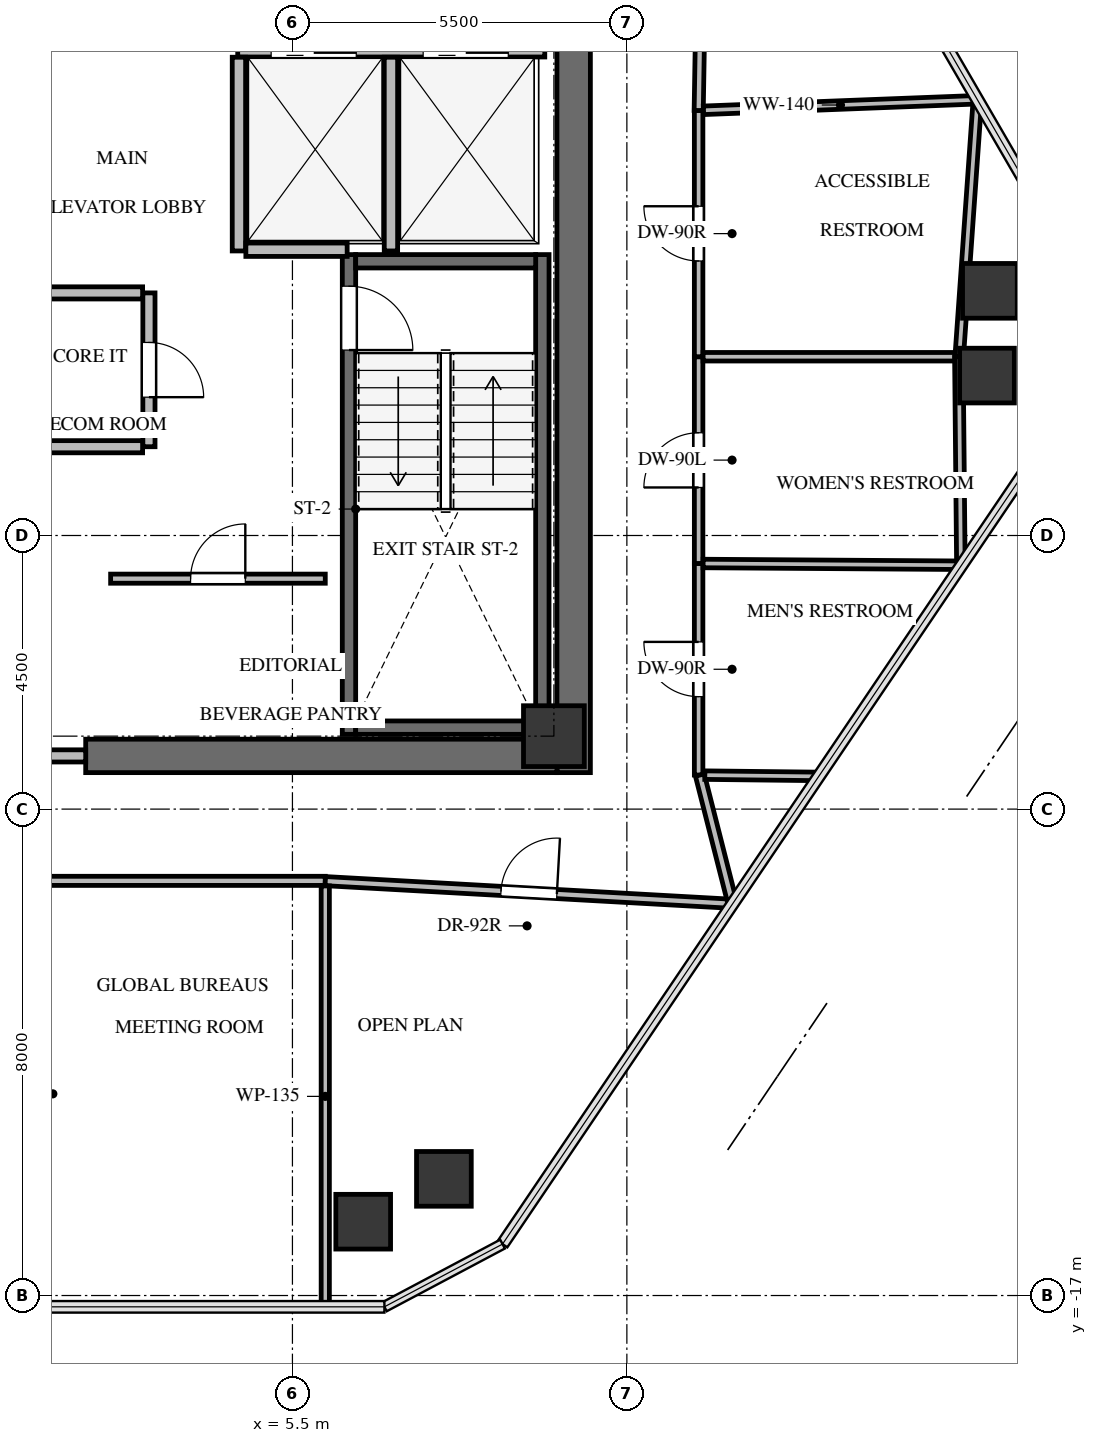
"""IFC4 building model, lengths in metres.
Left out: names, types, materials, properties, quantities, classifications, styles, units other than length and angle.
Written with IfcOpenShell. Run it as: python <this file> out.ifc"""

import sys

from ifc_helpers import new_model, si_unit, direction, frame, frame_2d, origin, origin_2d, place, context, subcontext, project, spatial, rectangle, extrude, source, transform, mapped, element, fill, save


model = new_model("IFC4")
c1 = context("Model", 3, precision=1e-05, world=origin(), true_north=direction((0.0, 1.0)))
c2 = subcontext(c1, "Body", "Model", "MODEL_VIEW")
j1 = project(units=[si_unit("LENGTHUNIT", "METRE"), si_unit("PLANEANGLEUNIT", "RADIAN")], contexts=[c1])
p1 = place(None, origin())
s1 = spatial("IfcSite", under=j1, at=p1, CompositionType="ELEMENT")
p2 = place(p1, origin())
s2 = spatial("IfcBuilding", under=s1, at=p2, CompositionType="ELEMENT")
p3 = place(p2, frame((0.0, 0.0, 238.1)))
s3 = spatial("IfcBuildingStorey", under=s2, at=p3, CompositionType="ELEMENT", Elevation=238.1)
p4 = place(p3, frame((10.125, -8.4, 0.0), z_axis=(0.0, 0.0, 1.0), x_axis=(0.0, 1.0, 0.0)))
e1 = element("IfcWall", 1, at=p4, inside=s3, PredefinedType="SHEAR", context=c2, shape_type="SweptSolid", body=[
    extrude(rectangle(XDim=16.8, YDim=0.55, at=frame_2d((8.4, 0.0))), origin(), (0.0, 0.0, 1.0), 3.3),
])
p5 = place(p3, frame((2.1, -8.125, 0.0), z_axis=(0.0, 0.0, 1.0), x_axis=(1.0, 0.0, 0.0)))
e2 = element("IfcWall", 2, at=p5, inside=s3, PredefinedType="SHEAR", context=c2, shape_type="SweptSolid", body=[
    extrude(rectangle(XDim=7.75, YDim=0.55, at=frame_2d((3.875, 0.0))), origin(), (0.0, 0.0, 1.0), 3.3),
])
p6 = place(p3, frame((9.61, -7.77, -0.24), z_axis=(0.0, 0.0, 1.0), x_axis=(0.0, 1.0, 0.0)))
e3 = element("IfcWall", 3, at=p6, inside=s3, PredefinedType="SHEAR", context=c2, shape_type="SweptSolid", body=[
    extrude(rectangle(XDim=7.89, YDim=0.22, at=frame_2d((3.945, 0.0))), origin(), (0.0, 0.0, 1.0), 3.3),
])
p7 = place(p3, frame((6.43, 0.12, -0.24), z_axis=(0.0, 0.0, 1.0), x_axis=(0.0, -1.0, 0.0)))
e4 = element("IfcWall", 4, at=p7, inside=s3, PredefinedType="SHEAR", context=c2, shape_type="SweptSolid", body=[
    extrude(rectangle(XDim=7.89, YDim=0.22, at=frame_2d((3.945, 0.0))), origin(), (0.0, 0.0, 1.0), 3.3),
])
p8 = place(p7, frame((0.52, 0.0, 0.0)))
e5 = element("IfcOpeningElement", 5, at=p8, cuts=e4, PredefinedType="OPENING", context=c2, shape_type="SweptSolid", body=[
    extrude(rectangle(XDim=1.05, YDim=2.15, at=frame_2d((0.525, 1.075))), frame((0.0, 0.12, 0.0), z_axis=(0.0, -1.0, 0.0), x_axis=(1.0, 0.0, 0.0)), (0.0, 0.0, 1.0), 0.24),
])
for number, where, z_axis, x_axis in (
    (6, (6.54, -7.66, -0.24), (0.0, 0.0, 1.0), (1.0, 0.0, 0.0)),
    (7, (9.5, 0.01, -0.24), (0.0, 0.0, 1.0), (-1.0, 0.0, 0.0)),
):
    element("IfcWall", number, at=place(p3, frame(where, z_axis=z_axis, x_axis=x_axis)), inside=s3, PredefinedType="SHEAR", context=c2, shape_type="SweptSolid", body=[
        extrude(rectangle(XDim=2.96, YDim=0.22, at=frame_2d((1.48, 0.0))), origin(), (0.0, 0.0, 1.0), 3.3),
    ])
m1 = source(origin(), c2, "Body", "SweptSolid", [
    extrude(rectangle(XDim=1.0, YDim=1.0, at=origin_2d()), origin(), (0.0, 0.0, 1.0), 3.3),
])
p9 = place(p3, frame((9.8, -7.8, -0.24), z_axis=(0.0, 0.0, 1.0), x_axis=(1.0, 0.0, 0.0)))
e8 = element("IfcColumn", 8, at=p9, inside=s3, PredefinedType="COLUMN", context=c2, shape_type="MappedRepresentation", body=[
    mapped(m1, transform((0.0, 0.0, 0.0), x_axis=(1.0, 0.0, 0.0), y_axis=(0.0, 1.0, 0.0), z_axis=(0.0, 0.0, 1.0), scale=1.0)),
])
m2 = source(origin(), c2, "Body", "SweptSolid", [
    extrude(rectangle(XDim=0.9, YDim=0.9, at=origin_2d()), origin(), (0.0, 0.0, 1.0), 3.3),
])
for number, where, z_axis, x_axis in (
    (9, (16.97, -0.476, -0.24), (0.0, 0.0, 1.0), (1.0, 0.0, 0.0)),
    (10, (16.922, -1.87, -0.24), (0.0, 0.0, 1.0), (1.0, 0.0, 0.0)),
    (11, (7.991, -15.081, -0.24), (0.0, 0.0, 1.0), (1.0, 0.0, 0.0)),
    (12, (6.664, -15.786, -0.24), (0.0, 0.0, 1.0), (1.0, 0.0, 0.0)),
):
    element("IfcColumn", number, at=place(p3, frame(where, z_axis=z_axis, x_axis=x_axis)), inside=s3, PredefinedType="COLUMN", context=c2, shape_type="MappedRepresentation", body=[
        mapped(m2, transform((0.0, 0.0, 0.0), x_axis=(1.0, 0.0, 0.0), y_axis=(0.0, 1.0, 0.0), z_axis=(0.0, 0.0, 1.0), scale=1.0)),
    ])
p10 = place(p3, frame((-2.1, -8.125, 0.0), z_axis=(0.0, 0.0, 1.0), x_axis=(1.0, 0.0, 0.0)))
e13 = element("IfcWall", 13, at=p10, inside=s3, PredefinedType="SOLIDWALL", context=c2, shape_type="SweptSolid", body=[
    extrude(rectangle(XDim=4.2, YDim=0.2, at=frame_2d((2.1, 0.0))), origin(), (0.0, 0.0, 1.0), 3.045),
])
p11 = place(p10, frame((1.2, 0.0, 0.0)))
e14 = element("IfcOpeningElement", 14, at=p11, cuts=e13, PredefinedType="OPENING", context=c2, shape_type="SweptSolid", body=[
    extrude(rectangle(XDim=1.8, YDim=2.15, at=frame_2d((0.9, 1.075))), frame((0.0, 0.11, 0.0), z_axis=(0.0, -1.0, 0.0), x_axis=(1.0, 0.0, 0.0)), (0.0, 0.0, 1.0), 0.22),
])
p12 = place(p3, frame((4.6, 3.48, 0.0), z_axis=(0.0, 0.0, 1.0), x_axis=(1.0, 0.0, 0.0)))
e15 = element("IfcWall", 15, at=p12, inside=s3, PredefinedType="SOLIDWALL", context=c2, shape_type="SweptSolid", body=[
    extrude(rectangle(XDim=5.05, YDim=0.22, at=frame_2d((2.525, 0.0))), origin(), (0.0, 0.0, 1.0), 3.045),
])
p13 = place(p12, frame((0.55, 0.0, 0.0)))
e16 = element("IfcOpeningElement", 16, at=p13, cuts=e15, PredefinedType="OPENING", context=c2, shape_type="SweptSolid", body=[
    extrude(rectangle(XDim=1.4, YDim=2.15, at=frame_2d((0.7, 1.075))), frame((0.0, 0.12, 0.0), z_axis=(0.0, -1.0, 0.0), x_axis=(1.0, 0.0, 0.0)), (0.0, 0.0, 1.0), 0.24),
])
p14 = place(p12, frame((3.05, 0.0, 0.0)))
e17 = element("IfcOpeningElement", 17, at=p14, cuts=e15, PredefinedType="OPENING", context=c2, shape_type="SweptSolid", body=[
    extrude(rectangle(XDim=1.4, YDim=2.15, at=frame_2d((0.7, 1.075))), frame((0.0, 0.12, 0.0), z_axis=(0.0, -1.0, 0.0), x_axis=(1.0, 0.0, 0.0)), (0.0, 0.0, 1.0), 0.24),
])
for number, where, z_axis, x_axis in (
    (18, (4.62, 0.18, 0.0), (0.0, 0.0, 1.0), (0.0, 1.0, 0.0)),
    (19, (7.12, 0.18, 0.0), (0.0, 0.0, 1.0), (0.0, 1.0, 0.0)),
):
    element("IfcWall", number, at=place(p3, frame(where, z_axis=z_axis, x_axis=x_axis)), inside=s3, PredefinedType="SOLIDWALL", context=c2, shape_type="SweptSolid", body=[
        extrude(rectangle(XDim=3.186, YDim=0.22, at=frame_2d((1.593, 0.0))), origin(), (0.0, 0.0, 1.0), 3.045),
    ])
p15 = place(p3, frame((4.734, 0.2, 0.0), z_axis=(0.0, 0.0, 1.0), x_axis=(1.0, 0.0, 0.0)))
e20 = element("IfcWall", 20, at=p15, inside=s3, PredefinedType="SOLIDWALL", context=c2, shape_type="SweptSolid", body=[
    extrude(rectangle(XDim=1.666, YDim=0.22, at=frame_2d((0.833, 0.0))), origin(), (0.0, 0.0, 1.0), 3.045),
])
p16 = place(p3, frame((2.51, -5.21, 0.0), z_axis=(0.0, 0.0, 1.0), x_axis=(1.0, 0.0, 0.0)))
e21 = element("IfcWall", 21, at=p16, inside=s3, PredefinedType="PARTITIONING", context=c2, shape_type="SweptSolid", body=[
    extrude(rectangle(XDim=3.53, YDim=0.15, at=frame_2d((1.765, 0.0))), origin(), (0.0, 0.0, 1.0), 3.045),
])
p17 = place(p16, frame((1.315, 0.0, 0.0)))
e22 = element("IfcOpeningElement", 22, at=p17, cuts=e21, PredefinedType="OPENING", context=c2, shape_type="SweptSolid", body=[
    extrude(rectangle(XDim=0.9, YDim=2.05, at=frame_2d((0.45, 1.025))), frame((0.0, 0.085, 0.0), z_axis=(0.0, -1.0, 0.0), x_axis=(1.0, 0.0, 0.0)), (0.0, 0.0, 1.0), 0.17),
])
p18 = place(p3, frame((3.14, -0.51, 0.0), z_axis=(0.0, 0.0, 1.0), x_axis=(0.0, -1.0, 0.0)))
e23 = element("IfcWall", 23, at=p18, inside=s3, PredefinedType="SOLIDWALL", context=c2, shape_type="SweptSolid", body=[
    extrude(rectangle(XDim=2.53, YDim=0.2, at=frame_2d((1.265, 0.0))), origin(), (0.0, 0.0, 1.0), 3.045),
])
p19 = place(p18, frame((0.815, 0.0, 0.0)))
e24 = element("IfcOpeningElement", 24, at=p19, cuts=e23, PredefinedType="OPENING", context=c2, shape_type="SweptSolid", body=[
    extrude(rectangle(XDim=0.9, YDim=2.05, at=frame_2d((0.45, 1.025))), frame((0.0, 0.11, 0.0), z_axis=(0.0, -1.0, 0.0), x_axis=(1.0, 0.0, 0.0)), (0.0, 0.0, 1.0), 0.22),
])
for number, where, z_axis, x_axis in (
    (25, (3.036, -3.04, 0.0), (0.0, 0.0, 1.0), (-1.0, 0.0, 0.0)),
    (26, (1.21, -0.51, 0.0), (0.0, 0.0, 1.0), (1.0, 0.0, 0.0)),
):
    element("IfcWall", number, at=place(p3, frame(where, z_axis=z_axis, x_axis=x_axis)), inside=s3, PredefinedType="SOLIDWALL", context=c2, shape_type="SweptSolid", body=[
        extrude(rectangle(XDim=1.826, YDim=0.2, at=frame_2d((0.913, 0.0))), origin(), (0.0, 0.0, 1.0), 3.045),
    ])
p20 = place(p3, frame((12.18, -8.44, 0.0), z_axis=(0.0, 0.0, 1.0), x_axis=(0.0, 1.0, 0.0)))
e27 = element("IfcWall", 27, at=p20, inside=s3, PredefinedType="PARTITIONING", context=c2, shape_type="SweptSolid", body=[
    extrude(rectangle(XDim=3.48, YDim=0.14, at=frame_2d((1.74, 0.0))), origin(), (0.0, 0.0, 1.0), 2.399),
])
p21 = place(p20, frame((1.29, 0.0, 0.0)))
e28 = element("IfcOpeningElement", 28, at=p21, cuts=e27, PredefinedType="OPENING", context=c2, shape_type="SweptSolid", body=[
    extrude(rectangle(XDim=0.9, YDim=2.05, at=frame_2d((0.45, 1.025))), frame((0.0, 0.08, 0.0), z_axis=(0.0, -1.0, 0.0), x_axis=(1.0, 0.0, 0.0)), (0.0, 0.0, 1.0), 0.16),
])
p22 = place(p3, frame((12.18, -4.96, 0.0), z_axis=(0.0, 0.0, 1.0), x_axis=(0.0, 1.0, 0.0)))
e29 = element("IfcWall", 29, at=p22, inside=s3, PredefinedType="PARTITIONING", context=c2, shape_type="SweptSolid", body=[
    extrude(rectangle(XDim=3.4, YDim=0.14, at=frame_2d((1.7, 0.0))), origin(), (0.0, 0.0, 1.0), 3.045),
])
p23 = place(p22, frame((1.25, 0.0, 0.0)))
e30 = element("IfcOpeningElement", 30, at=p23, cuts=e29, PredefinedType="OPENING", context=c2, shape_type="SweptSolid", body=[
    extrude(rectangle(XDim=0.9, YDim=2.05, at=frame_2d((0.45, 1.025))), frame((0.0, 0.08, 0.0), z_axis=(0.0, -1.0, 0.0), x_axis=(1.0, 0.0, 0.0)), (0.0, 0.0, 1.0), 0.16),
])
p24 = place(p3, frame((12.18, -1.56, 0.0), z_axis=(0.0, 0.0, 1.0), x_axis=(0.0, 1.0, 0.0)))
e31 = element("IfcWall", 31, at=p24, inside=s3, PredefinedType="PARTITIONING", context=c2, shape_type="SweptSolid", body=[
    extrude(rectangle(XDim=4.05, YDim=0.14, at=frame_2d((2.025, 0.0))), origin(), (0.0, 0.0, 1.0), 2.301),
])
p25 = place(p24, frame((1.575, 0.0, 0.0)))
e32 = element("IfcOpeningElement", 32, at=p25, cuts=e31, PredefinedType="OPENING", context=c2, shape_type="SweptSolid", body=[
    extrude(rectangle(XDim=0.9, YDim=2.05, at=frame_2d((0.45, 1.025))), frame((0.0, 0.08, 0.0), z_axis=(0.0, -1.0, 0.0), x_axis=(1.0, 0.0, 0.0)), (0.0, 0.0, 1.0), 0.16),
])
p26 = place(p3, frame((1.089, -10.18, 0.0), z_axis=(0.0, 0.0, 1.0), x_axis=(1.0, 0.0, 0.0)))
e33 = element("IfcWall", 33, at=p26, inside=s3, PredefinedType="PARTITIONING", context=c2, shape_type="SweptSolid", body=[
    extrude(rectangle(XDim=4.951, YDim=0.15, at=frame_2d((2.476, 0.0))), origin(), (0.0, 0.0, 1.0), 2.301),
])
p27 = place(p3, frame((6.04, -10.185, 0.0), z_axis=(0.0, 0.0, 1.0), x_axis=(0.998451046252, -0.055637291801, 0.0)))
e34 = element("IfcWall", 34, at=p27, inside=s3, PredefinedType="PARTITIONING", context=c2, shape_type="SweptSolid", body=[
    extrude(rectangle(XDim=6.709, YDim=0.15, at=frame_2d((3.355, 0.0))), origin(), (0.0, 0.0, 1.0), 2.399),
])
p28 = place(p27, frame((2.895, 0.0, 0.0)))
e35 = element("IfcOpeningElement", 35, at=p28, cuts=e34, PredefinedType="OPENING", context=c2, shape_type="SweptSolid", body=[
    extrude(rectangle(XDim=0.92, YDim=2.1, at=frame_2d((0.46, 1.05))), frame((0.0, 0.085, 0.0), z_axis=(0.0, -1.0, 0.0), x_axis=(1.0, 0.0, 0.0)), (0.0, 0.0, 1.0), 0.17),
])
p29 = place(p3, frame((12.719, -10.478, 0.0), z_axis=(0.0, 0.0, 1.0), x_axis=(-0.246522636262, 0.969137033556, 0.0)))
e36 = element("IfcWall", 36, at=p29, inside=s3, PredefinedType="PARTITIONING", context=c2, shape_type="SweptSolid", body=[
    extrude(rectangle(XDim=2.103, YDim=0.15, at=frame_2d((1.051, 0.0))), origin(), (0.0, 0.0, 1.0), 2.399),
])
p30 = place(p3, frame((12.181, 2.49, 0.0), z_axis=(0.0, 0.0, 1.0), x_axis=(0.016828669653, 0.999858387912, 0.0)))
e37 = element("IfcWall", 37, at=p30, inside=s3, PredefinedType="PARTITIONING", context=c2, shape_type="SweptSolid", body=[
    extrude(rectangle(XDim=7.674, YDim=0.15, at=frame_2d((3.837, 0.0))), origin(), (0.0, 0.0, 1.0), 2.399),
])
p31 = place(p30, frame((3.362, 0.0, 0.0)))
e38 = element("IfcOpeningElement", 38, at=p31, cuts=e37, PredefinedType="OPENING", context=c2, shape_type="SweptSolid", body=[
    extrude(rectangle(XDim=0.95, YDim=2.1, at=frame_2d((0.475, 1.05))), frame((0.0, 0.085, 0.0), z_axis=(0.0, -1.0, 0.0), x_axis=(1.0, 0.0, 0.0)), (0.0, 0.0, 1.0), 0.17),
])
p32 = place(p3, frame((12.254, -4.96, 0.0), z_axis=(0.0, 0.0, 1.0), x_axis=(0.999976630429, -0.006836563198, 0.0)))
e39 = element("IfcWall", 39, at=p32, inside=s3, PredefinedType="PARTITIONING", context=c2, shape_type="SweptSolid", body=[
    extrude(rectangle(XDim=4.25, YDim=0.14, at=frame_2d((2.125, 0.0))), origin(), (0.0, 0.0, 1.0), 2.399),
])
p33 = place(p3, frame((14.156, -8.462, 0.0), z_axis=(0.0, 0.0, 1.0), x_axis=(-0.999935742613, 0.011336253532, 0.0)))
e40 = element("IfcWall", 40, at=p33, inside=s3, PredefinedType="PARTITIONING", context=c2, shape_type="SweptSolid", body=[
    extrude(rectangle(XDim=1.874, YDim=0.14, at=frame_2d((0.937, 0.0))), origin(), (0.0, 0.0, 1.0), 2.399),
])
p34 = place(p3, frame((12.254, -1.56, 0.0), z_axis=(0.0, 0.0, 1.0), x_axis=(1.0, 0.0, 0.0)))
e41 = element("IfcWall", 41, at=p34, inside=s3, PredefinedType="PARTITIONING", context=c2, shape_type="SweptSolid", body=[
    extrude(rectangle(XDim=4.206, YDim=0.14, at=frame_2d((2.103, 0.0))), origin(), (0.0, 0.0, 1.0), 2.301),
])
p35 = place(p3, frame((16.46, -1.56, 0.0), z_axis=(0.0, 0.0, 1.0), x_axis=(0.009604446748, -0.999953876238, 0.0)))
e42 = element("IfcWall", 42, at=p35, inside=s3, PredefinedType="PARTITIONING", context=c2, shape_type="SweptSolid", body=[
    extrude(rectangle(XDim=3.355, YDim=0.14, at=frame_2d((1.678, 0.0))), origin(), (0.0, 0.0, 1.0), 2.301),
])
p36 = place(p3, frame((12.26, 2.493, 0.0), z_axis=(0.0, 0.0, 1.0), x_axis=(0.999256206289, 0.038562082324, 0.0)))
e43 = element("IfcWall", 43, at=p36, inside=s3, PredefinedType="PARTITIONING", context=c2, shape_type="SweptSolid", body=[
    extrude(rectangle(XDim=4.508, YDim=0.14, at=frame_2d((2.254, 0.0))), origin(), (0.0, 0.0, 1.0), 2.399),
])
p37 = place(p3, frame((16.76, 2.593, 0.0), z_axis=(0.0, 0.0, 1.0), x_axis=(-0.07055102187, -0.997508172053, 0.0)))
e44 = element("IfcWall", 44, at=p37, inside=s3, PredefinedType="PARTITIONING", context=c2, shape_type="SweptSolid", body=[
    extrude(rectangle(XDim=4.163, YDim=0.14, at=frame_2d((2.082, 0.0))), origin(), (0.0, 0.0, 1.0), 2.301),
])
p38 = place(p3, frame((6.04, -10.264, 0.0), z_axis=(0.0, 0.0, 1.0), x_axis=(0.0, -1.0, 0.0)))
e45 = element("IfcWall", 45, at=p38, inside=s3, PredefinedType="PARTITIONING", context=c2, shape_type="SweptSolid", body=[
    extrude(rectangle(XDim=6.922, YDim=0.135, at=frame_2d((3.461, 0.0))), origin(), (0.0, 0.0, 1.0), 2.301),
])
m3 = source(origin(), c2, "Body", "SweptSolid", [
    extrude(rectangle(XDim=1.05, YDim=2.15, at=frame_2d((0.525, 1.075))), frame((0.0, 0.025, 0.0), z_axis=(0.0, -1.0, 0.0), x_axis=(1.0, 0.0, 0.0)), (0.0, 0.0, 1.0), 0.05),
])
p39 = place(p8, origin())
e46 = element("IfcDoor", 46, at=p39, inside=s3, OperationType="SINGLE_SWING_RIGHT", PredefinedType="DOOR", context=c2, shape_type="MappedRepresentation", body=[
    mapped(m3, transform((0.0, 0.0, 0.0), x_axis=(1.0, 0.0, 0.0), y_axis=(0.0, 1.0, 0.0), z_axis=(0.0, 0.0, 1.0), scale=1.0)),
])
fill(e5, e46)
m4 = source(origin(), c2, "Body", "SweptSolid", [
    extrude(rectangle(XDim=0.9, YDim=2.05, at=frame_2d((0.45, 1.025))), frame((0.0, 0.025, 0.0), z_axis=(0.0, -1.0, 0.0), x_axis=(1.0, 0.0, 0.0)), (0.0, 0.0, 1.0), 0.05),
])
p40 = place(p17, origin())
e47 = element("IfcDoor", 47, at=p40, inside=s3, OperationType="SINGLE_SWING_RIGHT", PredefinedType="DOOR", context=c2, shape_type="MappedRepresentation", body=[
    mapped(m4, transform((0.0, 0.0, 0.0), x_axis=(1.0, 0.0, 0.0), y_axis=(0.0, 1.0, 0.0), z_axis=(0.0, 0.0, 1.0), scale=1.0)),
])
fill(e22, e47)
p41 = place(p19, origin())
e48 = element("IfcDoor", 48, at=p41, inside=s3, OperationType="SINGLE_SWING_RIGHT", PredefinedType="DOOR", context=c2, shape_type="MappedRepresentation", body=[
    mapped(m4, transform((0.0, 0.0, 0.0), x_axis=(1.0, 0.0, 0.0), y_axis=(0.0, 1.0, 0.0), z_axis=(0.0, 0.0, 1.0), scale=1.0)),
])
fill(e24, e48)
m5 = source(origin(), c2, "Body", "SweptSolid", [
    extrude(rectangle(XDim=0.9, YDim=2.05, at=frame_2d((0.45, 1.025))), frame((0.0, 0.025, 0.0), z_axis=(0.0, -1.0, 0.0), x_axis=(1.0, 0.0, 0.0)), (0.0, 0.0, 1.0), 0.05),
])
p42 = place(p21, origin())
e49 = element("IfcDoor", 49, at=p42, inside=s3, OperationType="SINGLE_SWING_RIGHT", PredefinedType="DOOR", context=c2, shape_type="MappedRepresentation", body=[
    mapped(m5, transform((0.0, 0.0, 0.0), x_axis=(1.0, 0.0, 0.0), y_axis=(0.0, 1.0, 0.0), z_axis=(0.0, 0.0, 1.0), scale=1.0)),
])
fill(e28, e49)
m6 = source(origin(), c2, "Body", "SweptSolid", [
    extrude(rectangle(XDim=0.9, YDim=2.05, at=frame_2d((0.45, 1.025))), frame((0.0, 0.025, 0.0), z_axis=(0.0, -1.0, 0.0), x_axis=(1.0, 0.0, 0.0)), (0.0, 0.0, 1.0), 0.05),
])
p43 = place(p23, origin())
e50 = element("IfcDoor", 50, at=p43, inside=s3, OperationType="SINGLE_SWING_LEFT", PredefinedType="DOOR", context=c2, shape_type="MappedRepresentation", body=[
    mapped(m6, transform((0.0, 0.0, 0.0), x_axis=(1.0, 0.0, 0.0), y_axis=(0.0, 1.0, 0.0), z_axis=(0.0, 0.0, 1.0), scale=1.0)),
])
fill(e30, e50)
p44 = place(p25, origin())
e51 = element("IfcDoor", 51, at=p44, inside=s3, OperationType="SINGLE_SWING_RIGHT", PredefinedType="DOOR", context=c2, shape_type="MappedRepresentation", body=[
    mapped(m5, transform((0.0, 0.0, 0.0), x_axis=(1.0, 0.0, 0.0), y_axis=(0.0, 1.0, 0.0), z_axis=(0.0, 0.0, 1.0), scale=1.0)),
])
fill(e32, e51)
m7 = source(origin(), c2, "Body", "SweptSolid", [
    extrude(rectangle(XDim=0.92, YDim=2.1, at=frame_2d((0.46, 1.05))), frame((0.0, 0.025, 0.0), z_axis=(0.0, -1.0, 0.0), x_axis=(1.0, 0.0, 0.0)), (0.0, 0.0, 1.0), 0.05),
])
p45 = place(p28, origin())
e52 = element("IfcDoor", 52, at=p45, inside=s3, OperationType="SINGLE_SWING_RIGHT", PredefinedType="DOOR", context=c2, shape_type="MappedRepresentation", body=[
    mapped(m7, transform((0.0, 0.0, 0.0), x_axis=(1.0, 0.0, 0.0), y_axis=(0.0, 1.0, 0.0), z_axis=(0.0, 0.0, 1.0), scale=1.0)),
])
fill(e35, e52)
save(model, sys.argv[1])
